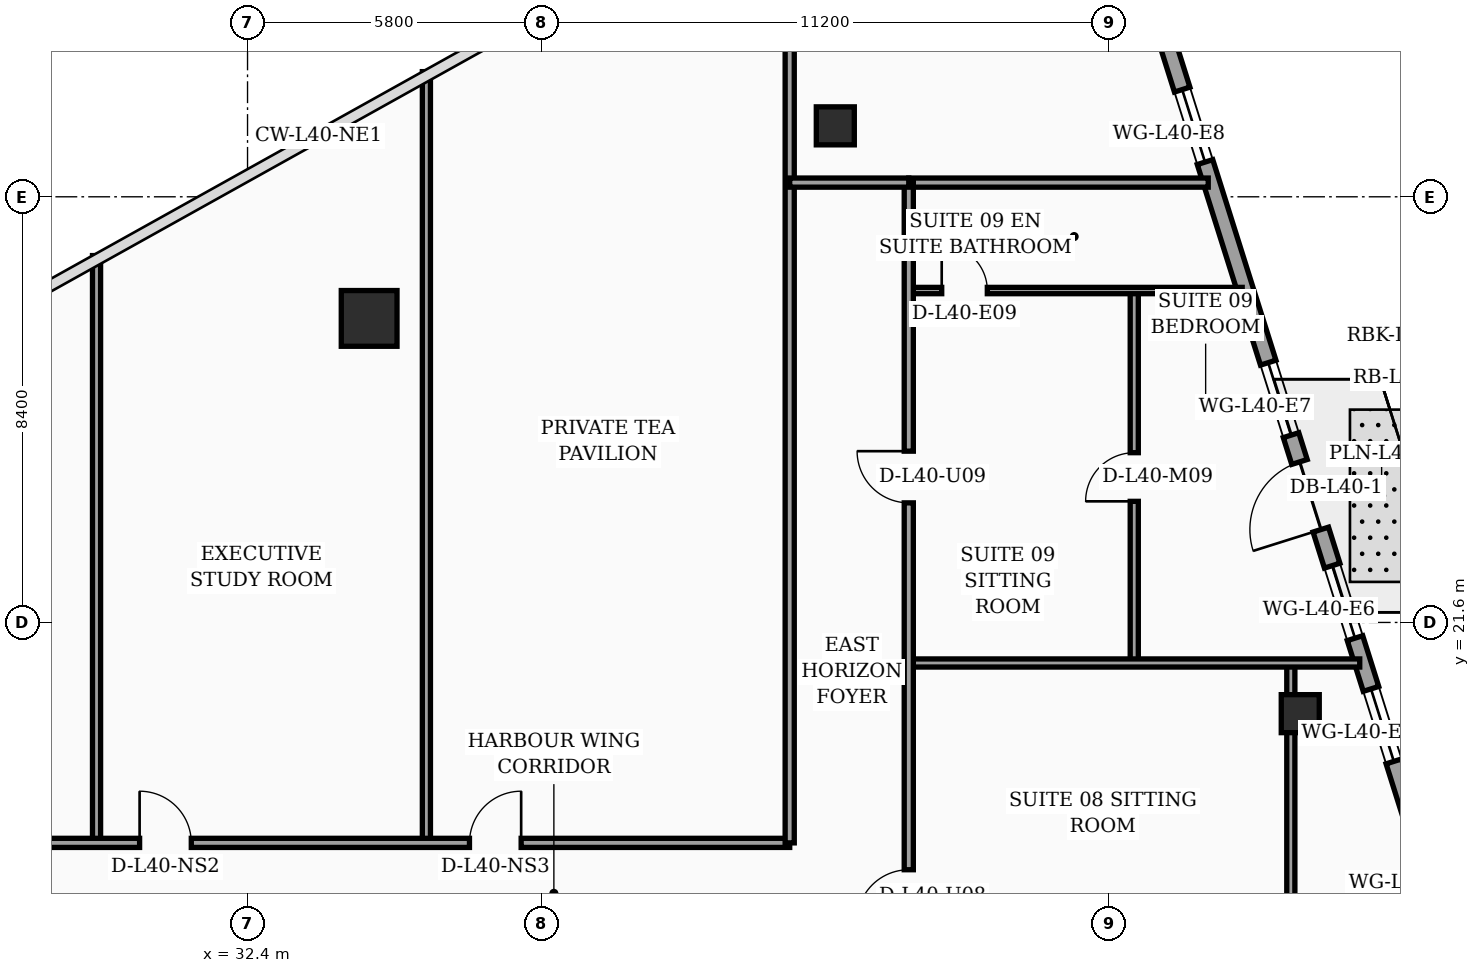
"""IFC4 building model, lengths in metres.
Left out: names, types, materials, properties, quantities, classifications, styles, units other than length and angle.
Written with IfcOpenShell. Run it as: python <this file> out.ifc"""

import sys

from ifc_helpers import new_model, si_unit, direction, frame, frame_2d, origin, origin_2d, place, context, subcontext, project, spatial, rectangle, hollow_rectangle, circle, extrude, element, fill, save


model = new_model("IFC4")
c1 = context("Model", 3, precision=1e-05, world=origin(), true_north=direction((0.0, 1.0)))
c2 = subcontext(c1, "Body", "Model", "MODEL_VIEW")
j1 = project(units=[si_unit("LENGTHUNIT", "METRE"), si_unit("PLANEANGLEUNIT", "RADIAN")], contexts=[c1])
p1 = place(None, origin())
s1 = spatial("IfcSite", under=j1, at=p1, CompositionType="ELEMENT")
p2 = place(p1, origin())
s2 = spatial("IfcBuilding", under=s1, at=p2, CompositionType="ELEMENT")
p3 = place(p2, frame((0.0, 0.0, 163.7)))
s3 = spatial("IfcBuildingStorey", under=s2, at=p3, CompositionType="ELEMENT", Elevation=163.7)
p4 = place(p3, frame((34.8, 27.6, 0.0), z_axis=(0.0, 0.0, 1.0), x_axis=(1.0, 0.0, 0.0)))
e1 = element("IfcColumn", 1, at=p4, inside=s3, PredefinedType="COLUMN", context=c2, shape_type="SweptSolid", body=[
    extrude(circle(Radius=0.55, at=origin_2d()), origin(), (0.0, 0.0, 1.0), 3.56),
])
for number, where, z_axis, x_axis in (
    (2, (44.0, 31.4, 0.0), (0.0, 0.0, 1.0), (1.0, 0.0, 0.0)),
    (3, (53.176, 19.8, 0.0), (0.0, 0.0, 1.0), (1.0, 0.0, 0.0)),
):
    element("IfcColumn", number, at=place(p3, frame(where, z_axis=z_axis, x_axis=x_axis)), inside=s3, PredefinedType="COLUMN", context=c2, shape_type="SweptSolid", body=[
        extrude(hollow_rectangle(XDim=0.75, YDim=0.75, WallThickness=0.032, at=origin_2d()), origin(), (0.0, 0.0, 1.0), 3.56),
    ])
p5 = place(p3, frame((59.23, 5.505, 0.0), z_axis=(0.0, 0.0, 1.0), x_axis=(-0.300509063924, 0.953778958931, 0.0)))
e4 = element("IfcWall", 4, at=p5, inside=s3, PredefinedType="SOLIDWALL", context=c2, shape_type="SweptSolid", body=[
    extrude(rectangle(XDim=30.814, YDim=0.32, at=frame_2d((15.407, 0.0))), origin(), (0.0, 0.0, 1.0), 3.56),
])
p6 = place(p5, frame((18.796, 0.0, 0.0)))
e5 = element("IfcOpeningElement", 5, at=p6, cuts=e4, PredefinedType="OPENING", context=c2, shape_type="SweptSolid", body=[
    extrude(rectangle(XDim=1.4, YDim=2.25, at=frame_2d((0.7, 1.125))), frame((0.0, 0.17, 0.0), z_axis=(0.0, -1.0, 0.0), x_axis=(1.0, 0.0, 0.0)), (0.0, 0.0, 1.0), 0.34),
])
p7 = place(p5, frame((2.65, 0.0, 0.75)))
e6 = element("IfcOpeningElement", 6, at=p7, cuts=e4, PredefinedType="OPENING", context=c2, shape_type="SweptSolid", body=[
    extrude(rectangle(XDim=1.5, YDim=1.6, at=frame_2d((0.75, 0.8))), frame((0.0, 0.17, 0.0), z_axis=(0.0, -1.0, 0.0), x_axis=(1.0, 0.0, 0.0)), (0.0, 0.0, 1.0), 0.34),
])
p8 = place(p5, frame((4.7, 0.0, 0.75)))
e7 = element("IfcOpeningElement", 7, at=p8, cuts=e4, PredefinedType="OPENING", context=c2, shape_type="SweptSolid", body=[
    extrude(rectangle(XDim=1.5, YDim=1.6, at=frame_2d((0.75, 0.8))), frame((0.0, 0.17, 0.0), z_axis=(0.0, -1.0, 0.0), x_axis=(1.0, 0.0, 0.0)), (0.0, 0.0, 1.0), 0.34),
])
p9 = place(p5, frame((7.8, 0.0, 0.75)))
e8 = element("IfcOpeningElement", 8, at=p9, cuts=e4, PredefinedType="OPENING", context=c2, shape_type="SweptSolid", body=[
    extrude(rectangle(XDim=1.5, YDim=1.6, at=frame_2d((0.75, 0.8))), frame((0.0, 0.17, 0.0), z_axis=(0.0, -1.0, 0.0), x_axis=(1.0, 0.0, 0.0)), (0.0, 0.0, 1.0), 0.34),
])
p10 = place(p5, frame((10.9, 0.0, 0.75)))
e9 = element("IfcOpeningElement", 9, at=p10, cuts=e4, PredefinedType="OPENING", context=c2, shape_type="SweptSolid", body=[
    extrude(rectangle(XDim=1.5, YDim=1.6, at=frame_2d((0.75, 0.8))), frame((0.0, 0.17, 0.0), z_axis=(0.0, -1.0, 0.0), x_axis=(1.0, 0.0, 0.0)), (0.0, 0.0, 1.0), 0.34),
])
p11 = place(p5, frame((14.0, 0.0, 0.75)))
e10 = element("IfcOpeningElement", 10, at=p11, cuts=e4, PredefinedType="OPENING", context=c2, shape_type="SweptSolid", body=[
    extrude(rectangle(XDim=1.5, YDim=1.6, at=frame_2d((0.75, 0.8))), frame((0.0, 0.17, 0.0), z_axis=(0.0, -1.0, 0.0), x_axis=(1.0, 0.0, 0.0)), (0.0, 0.0, 1.0), 0.34),
])
p12 = place(p5, frame((16.55, 0.0, 0.75)))
e11 = element("IfcOpeningElement", 11, at=p12, cuts=e4, PredefinedType="OPENING", context=c2, shape_type="SweptSolid", body=[
    extrude(rectangle(XDim=1.5, YDim=1.6, at=frame_2d((0.75, 0.8))), frame((0.0, 0.17, 0.0), z_axis=(0.0, -1.0, 0.0), x_axis=(1.0, 0.0, 0.0)), (0.0, 0.0, 1.0), 0.34),
])
p13 = place(p5, frame((20.75, 0.0, 0.75)))
e12 = element("IfcOpeningElement", 12, at=p13, cuts=e4, PredefinedType="OPENING", context=c2, shape_type="SweptSolid", body=[
    extrude(rectangle(XDim=1.5, YDim=1.6, at=frame_2d((0.75, 0.8))), frame((0.0, 0.17, 0.0), z_axis=(0.0, -1.0, 0.0), x_axis=(1.0, 0.0, 0.0)), (0.0, 0.0, 1.0), 0.34),
])
p14 = place(p5, frame((26.4, 0.0, 0.75)))
e13 = element("IfcOpeningElement", 13, at=p14, cuts=e4, PredefinedType="OPENING", context=c2, shape_type="SweptSolid", body=[
    extrude(rectangle(XDim=1.5, YDim=1.6, at=frame_2d((0.75, 0.8))), frame((0.0, 0.17, 0.0), z_axis=(0.0, -1.0, 0.0), x_axis=(1.0, 0.0, 0.0)), (0.0, 0.0, 1.0), 0.34),
])
p15 = place(p3, frame((29.42, 17.25, 0.0), z_axis=(0.0, 0.0, 1.0), x_axis=(0.0, 1.0, 0.0)))
e14 = element("IfcWall", 14, at=p15, inside=s3, PredefinedType="PARTITIONING", context=c2, shape_type="SweptSolid", body=[
    extrude(rectangle(XDim=11.59, YDim=0.16, at=frame_2d((5.795, 0.0))), origin(), (0.0, 0.0, 1.0), 2.94),
])
p16 = place(p3, frame((35.93, 17.25, 0.0), z_axis=(0.0, 0.0, 1.0), x_axis=(0.0, 1.0, 0.0)))
e15 = element("IfcWall", 15, at=p16, inside=s3, PredefinedType="PARTITIONING", context=c2, shape_type="SweptSolid", body=[
    extrude(rectangle(XDim=15.22, YDim=0.16, at=frame_2d((7.61, 0.0))), origin(), (0.0, 0.0, 1.0), 2.94),
])
p17 = place(p3, frame((21.5, 17.25, 0.0), z_axis=(0.0, 0.0, 1.0), x_axis=(1.0, 0.0, 0.0)))
e16 = element("IfcWall", 16, at=p17, inside=s3, PredefinedType="PARTITIONING", context=c2, shape_type="SweptSolid", body=[
    extrude(rectangle(XDim=21.6, YDim=0.18, at=frame_2d((10.8, 0.0))), origin(), (0.0, 0.0, 1.0), 2.94),
])
p18 = place(p17, frame((0.95, 0.0, 0.0)))
e17 = element("IfcOpeningElement", 17, at=p18, cuts=e16, PredefinedType="OPENING", context=c2, shape_type="SweptSolid", body=[
    extrude(rectangle(XDim=1.02, YDim=2.2, at=frame_2d((0.51, 1.1))), frame((0.0, 0.1, 0.0), z_axis=(0.0, -1.0, 0.0), x_axis=(1.0, 0.0, 0.0)), (0.0, 0.0, 1.0), 0.2),
])
p19 = place(p17, frame((8.77, 0.0, 0.0)))
e18 = element("IfcOpeningElement", 18, at=p19, cuts=e16, PredefinedType="OPENING", context=c2, shape_type="SweptSolid", body=[
    extrude(rectangle(XDim=1.02, YDim=2.2, at=frame_2d((0.51, 1.1))), frame((0.0, 0.1, 0.0), z_axis=(0.0, -1.0, 0.0), x_axis=(1.0, 0.0, 0.0)), (0.0, 0.0, 1.0), 0.2),
])
p20 = place(p17, frame((15.28, 0.0, 0.0)))
e19 = element("IfcOpeningElement", 19, at=p20, cuts=e16, PredefinedType="OPENING", context=c2, shape_type="SweptSolid", body=[
    extrude(rectangle(XDim=1.02, YDim=2.2, at=frame_2d((0.51, 1.1))), frame((0.0, 0.1, 0.0), z_axis=(0.0, -1.0, 0.0), x_axis=(1.0, 0.0, 0.0)), (0.0, 0.0, 1.0), 0.2),
])
p21 = place(p3, frame((43.1, 17.25, 0.0), z_axis=(0.0, 0.0, 1.0), x_axis=(0.0, 1.0, 0.0)))
e20 = element("IfcWall", 20, at=p21, inside=s3, PredefinedType="PARTITIONING", context=c2, shape_type="SweptSolid", body=[
    extrude(rectangle(XDim=19.21, YDim=0.18, at=frame_2d((9.605, 0.0))), origin(), (0.0, 0.0, 1.0), 2.94),
])
p22 = place(p3, frame((52.99, 7.45, 0.0), z_axis=(0.0, 0.0, 1.0), x_axis=(0.0, 1.0, 0.0)))
e21 = element("IfcWall", 21, at=p22, inside=s3, PredefinedType="PARTITIONING", context=c2, shape_type="SweptSolid", body=[
    extrude(rectangle(XDim=13.35, YDim=0.16, at=frame_2d((6.675, 0.0))), origin(), (0.0, 0.0, 1.0), 2.94),
])
p23 = place(p22, frame((6.2, 0.0, 0.0)))
e22 = element("IfcOpeningElement", 22, at=p23, cuts=e21, PredefinedType="OPENING", context=c2, shape_type="SweptSolid", body=[
    extrude(rectangle(XDim=0.96, YDim=2.2, at=frame_2d((0.48, 1.1))), frame((0.0, 0.09, 0.0), z_axis=(0.0, -1.0, 0.0), x_axis=(1.0, 0.0, 0.0)), (0.0, 0.0, 1.0), 0.18),
])
p24 = place(p3, frame((49.9, 20.8, 0.0), z_axis=(0.0, 0.0, 1.0), x_axis=(0.0, 1.0, 0.0)))
e23 = element("IfcWall", 23, at=p24, inside=s3, PredefinedType="PARTITIONING", context=c2, shape_type="SweptSolid", body=[
    extrude(rectangle(XDim=7.35, YDim=0.16, at=frame_2d((3.675, 0.0))), origin(), (0.0, 0.0, 1.0), 3.04),
])
p25 = place(p24, frame((3.19, 0.0, 0.0)))
e24 = element("IfcOpeningElement", 24, at=p25, cuts=e23, PredefinedType="OPENING", context=c2, shape_type="SweptSolid", body=[
    extrude(rectangle(XDim=0.96, YDim=2.2, at=frame_2d((0.48, 1.1))), frame((0.0, 0.09, 0.0), z_axis=(0.0, -1.0, 0.0), x_axis=(1.0, 0.0, 0.0)), (0.0, 0.0, 1.0), 0.18),
])
p26 = place(p3, frame((45.45, 28.15, 0.0), z_axis=(0.0, 0.0, 1.0), x_axis=(1.0, 0.0, 0.0)))
e25 = element("IfcWall", 25, at=p26, inside=s3, PredefinedType="PARTITIONING", context=c2, shape_type="SweptSolid", body=[
    extrude(rectangle(XDim=6.58, YDim=0.125, at=frame_2d((3.29, 0.0))), origin(), (0.0, 0.0, 1.0), 3.04),
])
p27 = place(p26, frame((0.65, 0.0, 0.0)))
e26 = element("IfcOpeningElement", 26, at=p27, cuts=e25, PredefinedType="OPENING", context=c2, shape_type="SweptSolid", body=[
    extrude(rectangle(XDim=0.9, YDim=2.15, at=frame_2d((0.45, 1.075))), frame((0.0, 0.073, 0.0), z_axis=(0.0, -1.0, 0.0), x_axis=(1.0, 0.0, 0.0)), (0.0, 0.0, 1.0), 0.145),
])
p28 = place(p3, frame((45.45, 20.8, 0.0), z_axis=(0.0, 0.0, 1.0), x_axis=(1.0, 0.0, 0.0)))
e27 = element("IfcWall", 27, at=p28, inside=s3, PredefinedType="PARTITIONING", context=c2, shape_type="SweptSolid", body=[
    extrude(rectangle(XDim=8.9, YDim=0.16, at=frame_2d((4.45, 0.0))), origin(), (0.0, 0.0, 1.0), 2.94),
])
p29 = place(p3, frame((45.45, 30.28, 0.0), z_axis=(0.0, 0.0, 1.0), x_axis=(1.0, 0.0, 0.0)))
e28 = element("IfcWall", 28, at=p29, inside=s3, PredefinedType="PARTITIONING", context=c2, shape_type="SweptSolid", body=[
    extrude(rectangle(XDim=5.91, YDim=0.18, at=frame_2d((2.955, 0.0))), origin(), (0.0, 0.0, 1.0), 2.94),
])
p30 = place(p3, frame((45.45, 2.44, 0.0), z_axis=(0.0, 0.0, 1.0), x_axis=(0.0, 1.0, 0.0)))
e29 = element("IfcWall", 29, at=p30, inside=s3, PredefinedType="PARTITIONING", context=c2, shape_type="SweptSolid", body=[
    extrude(rectangle(XDim=27.84, YDim=0.18, at=frame_2d((13.92, 0.0))), origin(), (0.0, 0.0, 1.0), 2.94),
])
p31 = place(p30, frame((13.26, 0.0, 0.0)))
e30 = element("IfcOpeningElement", 30, at=p31, cuts=e29, PredefinedType="OPENING", context=c2, shape_type="SweptSolid", body=[
    extrude(rectangle(XDim=1.02, YDim=2.2, at=frame_2d((0.51, 1.1))), frame((0.0, 0.1, 0.0), z_axis=(0.0, -1.0, 0.0), x_axis=(1.0, 0.0, 0.0)), (0.0, 0.0, 1.0), 0.2),
])
p32 = place(p30, frame((21.52, 0.0, 0.0)))
e31 = element("IfcOpeningElement", 31, at=p32, cuts=e29, PredefinedType="OPENING", context=c2, shape_type="SweptSolid", body=[
    extrude(rectangle(XDim=1.02, YDim=2.2, at=frame_2d((0.51, 1.1))), frame((0.0, 0.1, 0.0), z_axis=(0.0, -1.0, 0.0), x_axis=(1.0, 0.0, 0.0)), (0.0, 0.0, 1.0), 0.2),
])
p33 = place(p3, frame((43.1, 30.28, 0.0), z_axis=(0.0, 0.0, 1.0), x_axis=(1.0, 0.0, 0.0)))
e32 = element("IfcWall", 32, at=p33, inside=s3, PredefinedType="PARTITIONING", context=c2, shape_type="SweptSolid", body=[
    extrude(rectangle(XDim=2.35, YDim=0.18, at=frame_2d((1.175, 0.0))), origin(), (0.0, 0.0, 1.0), 2.94),
])
p34 = place(p6, origin())
e33 = element("IfcDoor", 33, at=p34, inside=s3, OperationType="SINGLE_SWING_LEFT", PredefinedType="DOOR", context=c2, shape_type="SweptSolid", body=[
    extrude(rectangle(XDim=1.4, YDim=2.25, at=frame_2d((0.7, 1.125))), frame((0.0, 0.025, 0.0), z_axis=(0.0, -1.0, 0.0), x_axis=(1.0, 0.0, 0.0)), (0.0, 0.0, 1.0), 0.05),
])
fill(e5, e33)
p35 = place(p11, origin())
e34 = element("IfcWindow", 34, at=p35, inside=s3, PartitioningType="SINGLE_PANEL", PredefinedType="WINDOW", context=c2, shape_type="SweptSolid", body=[
    extrude(rectangle(XDim=1.5, YDim=1.6, at=frame_2d((0.75, 0.8))), frame((0.0, 0.03, 0.0), z_axis=(0.0, -1.0, 0.0), x_axis=(1.0, 0.0, 0.0)), (0.0, 0.0, 1.0), 0.06),
])
fill(e10, e34)
p36 = place(p12, origin())
e35 = element("IfcWindow", 35, at=p36, inside=s3, PartitioningType="SINGLE_PANEL", PredefinedType="WINDOW", context=c2, shape_type="SweptSolid", body=[
    extrude(rectangle(XDim=1.5, YDim=1.6, at=frame_2d((0.75, 0.8))), frame((0.0, 0.03, 0.0), z_axis=(0.0, -1.0, 0.0), x_axis=(1.0, 0.0, 0.0)), (0.0, 0.0, 1.0), 0.06),
])
fill(e11, e35)
p37 = place(p13, origin())
e36 = element("IfcWindow", 36, at=p37, inside=s3, PartitioningType="SINGLE_PANEL", PredefinedType="WINDOW", context=c2, shape_type="SweptSolid", body=[
    extrude(rectangle(XDim=1.5, YDim=1.6, at=frame_2d((0.75, 0.8))), frame((0.0, 0.03, 0.0), z_axis=(0.0, -1.0, 0.0), x_axis=(1.0, 0.0, 0.0)), (0.0, 0.0, 1.0), 0.06),
])
fill(e12, e36)
p38 = place(p14, origin())
e37 = element("IfcWindow", 37, at=p38, inside=s3, PartitioningType="SINGLE_PANEL", PredefinedType="WINDOW", context=c2, shape_type="SweptSolid", body=[
    extrude(rectangle(XDim=1.5, YDim=1.6, at=frame_2d((0.75, 0.8))), frame((0.0, 0.03, 0.0), z_axis=(0.0, -1.0, 0.0), x_axis=(1.0, 0.0, 0.0)), (0.0, 0.0, 1.0), 0.06),
])
fill(e13, e37)
p39 = place(p19, origin())
e38 = element("IfcDoor", 38, at=p39, inside=s3, OperationType="SINGLE_SWING_LEFT", PredefinedType="DOOR", context=c2, shape_type="SweptSolid", body=[
    extrude(rectangle(XDim=1.02, YDim=2.2, at=frame_2d((0.51, 1.1))), frame((0.0, 0.025, 0.0), z_axis=(0.0, -1.0, 0.0), x_axis=(1.0, 0.0, 0.0)), (0.0, 0.0, 1.0), 0.05),
])
fill(e18, e38)
p40 = place(p20, origin())
e39 = element("IfcDoor", 39, at=p40, inside=s3, OperationType="SINGLE_SWING_RIGHT", PredefinedType="DOOR", context=c2, shape_type="SweptSolid", body=[
    extrude(rectangle(XDim=1.02, YDim=2.2, at=frame_2d((0.51, 1.1))), frame((0.0, 0.025, 0.0), z_axis=(0.0, -1.0, 0.0), x_axis=(1.0, 0.0, 0.0)), (0.0, 0.0, 1.0), 0.05),
])
fill(e19, e39)
p41 = place(p25, origin())
e40 = element("IfcDoor", 40, at=p41, inside=s3, OperationType="SINGLE_SWING_LEFT", PredefinedType="DOOR", context=c2, shape_type="SweptSolid", body=[
    extrude(rectangle(XDim=0.96, YDim=2.2, at=frame_2d((0.48, 1.1))), frame((0.0, 0.025, 0.0), z_axis=(0.0, -1.0, 0.0), x_axis=(1.0, 0.0, 0.0)), (0.0, 0.0, 1.0), 0.05),
])
fill(e24, e40)
p42 = place(p27, origin())
e41 = element("IfcDoor", 41, at=p42, inside=s3, OperationType="SINGLE_SWING_LEFT", PredefinedType="DOOR", context=c2, shape_type="SweptSolid", body=[
    extrude(rectangle(XDim=0.9, YDim=2.15, at=frame_2d((0.45, 1.075))), frame((0.0, 0.025, 0.0), z_axis=(0.0, -1.0, 0.0), x_axis=(1.0, 0.0, 0.0)), (0.0, 0.0, 1.0), 0.05),
])
fill(e26, e41)
p43 = place(p31, origin())
e42 = element("IfcDoor", 42, at=p43, inside=s3, OperationType="SINGLE_SWING_LEFT", PredefinedType="DOOR", context=c2, shape_type="SweptSolid", body=[
    extrude(rectangle(XDim=1.02, YDim=2.2, at=frame_2d((0.51, 1.1))), frame((0.0, 0.025, 0.0), z_axis=(0.0, -1.0, 0.0), x_axis=(1.0, 0.0, 0.0)), (0.0, 0.0, 1.0), 0.05),
])
fill(e30, e42)
p44 = place(p32, origin())
e43 = element("IfcDoor", 43, at=p44, inside=s3, OperationType="SINGLE_SWING_RIGHT", PredefinedType="DOOR", context=c2, shape_type="SweptSolid", body=[
    extrude(rectangle(XDim=1.02, YDim=2.2, at=frame_2d((0.51, 1.1))), frame((0.0, 0.025, 0.0), z_axis=(0.0, -1.0, 0.0), x_axis=(1.0, 0.0, 0.0)), (0.0, 0.0, 1.0), 0.05),
])
fill(e31, e43)
save(model, sys.argv[1])
